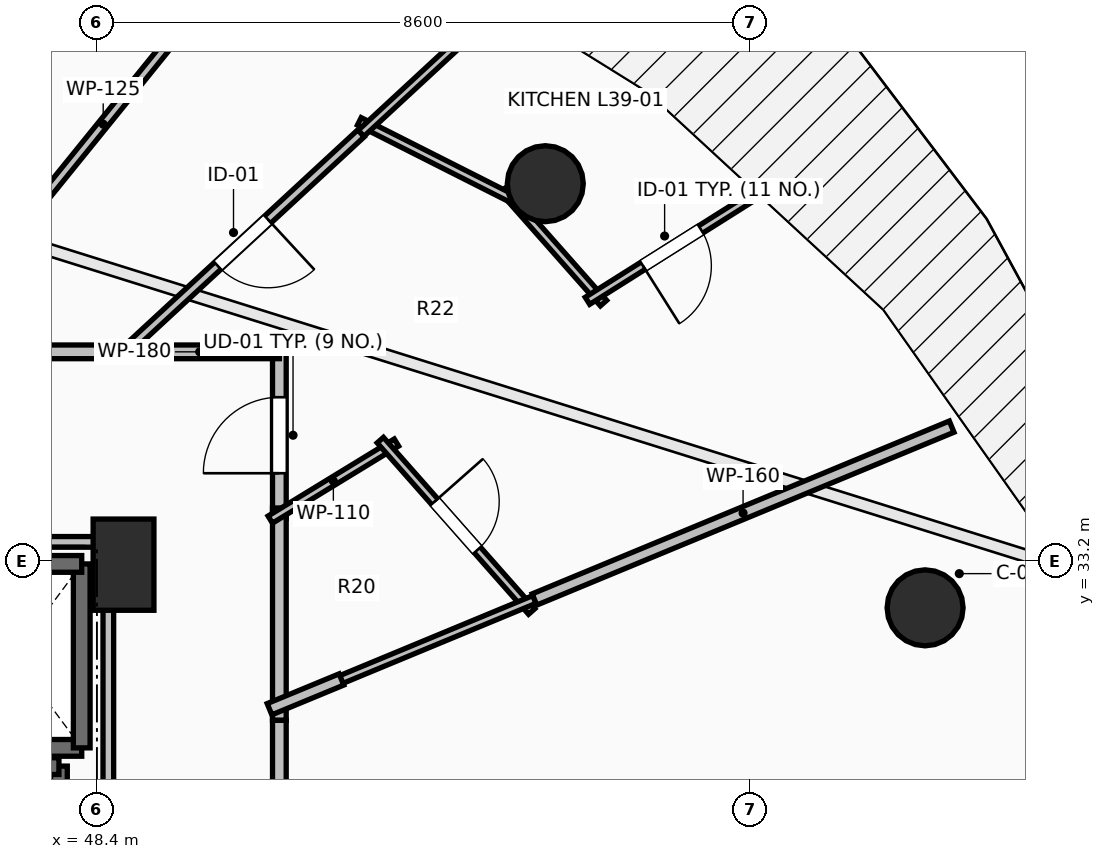
"""IFC4 building model, lengths in metres.
Left out: names, types, materials, properties, quantities, classifications, styles, units other than length and angle.
Written with IfcOpenShell. Run it as: python <this file> out.ifc"""

import sys

from ifc_helpers import new_model, si_unit, direction, frame, frame_2d, origin, origin_2d, place, context, subcontext, project, spatial, rectangle, circle, extrude, element, fill, save


model = new_model("IFC4")
c1 = context("Model", 3, precision=1e-05, world=origin(), true_north=direction((0.0, 1.0)))
c2 = subcontext(c1, "Body", "Model", "MODEL_VIEW")
j1 = project(units=[si_unit("LENGTHUNIT", "METRE"), si_unit("PLANEANGLEUNIT", "RADIAN")], contexts=[c1])
p1 = place(None, origin())
s1 = spatial("IfcSite", under=j1, at=p1, CompositionType="ELEMENT")
p2 = place(p1, origin())
s2 = spatial("IfcBuilding", under=s1, at=p2, CompositionType="ELEMENT")
p3 = place(p2, frame((0.0, 0.0, 146.6)))
s3 = spatial("IfcBuildingStorey", under=s2, at=p3, CompositionType="ELEMENT", Elevation=146.6)
for number, where, z_axis, x_axis in (
    (1, (59.295, 32.582, 0.0), (0.0, 0.0, 1.0), (0.924, 0.383, 0.0)),
    (2, (54.299, 38.162, 0.0), (0.0, 0.0, 1.0), (0.707, 0.707, 0.0)),
):
    element("IfcColumn", number, at=place(p3, frame(where, z_axis=z_axis, x_axis=x_axis)), inside=s3, PredefinedType="COLUMN", context=c2, shape_type="SweptSolid", body=[
        extrude(circle(Radius=0.5, at=origin_2d()), origin(), (0.0, 0.0, 1.0), 3.5),
    ])
p4 = place(p3, frame((48.75, 33.15, 0.0), z_axis=(0.0, 0.0, 1.0), x_axis=(1.0, 0.0, 0.0)))
e3 = element("IfcColumn", 3, at=p4, inside=s3, PredefinedType="PILASTER", context=c2, shape_type="SweptSolid", body=[
    extrude(rectangle(XDim=0.8, YDim=1.2, at=origin_2d()), origin(), (0.0, 0.0, 1.0), 3.5),
])
p5 = place(p3, frame((46.4, 30.74, 0.0), z_axis=(0.0, 0.0, 1.0), x_axis=(1.0, 0.0, 0.0)))
e4 = element("IfcWall", 4, at=p5, inside=s3, PredefinedType="SOLIDWALL", context=c2, shape_type="SweptSolid", body=[
    extrude(rectangle(XDim=1.8, YDim=0.22, at=frame_2d((0.9, 0.0))), origin(), (0.0, 0.0, 1.0), 3.24),
])
p6 = place(p3, frame((48.2, 30.74, 0.0), z_axis=(0.0, 0.0, 1.0), x_axis=(0.0, 1.0, 0.0)))
e5 = element("IfcWall", 5, at=p6, inside=s3, PredefinedType="SOLIDWALL", context=c2, shape_type="SweptSolid", body=[
    extrude(rectangle(XDim=2.42, YDim=0.22, at=frame_2d((1.21, 0.0))), origin(), (0.0, 0.0, 1.0), 3.24),
])
p7 = place(p3, frame((48.2, 33.16, 0.0), z_axis=(0.0, 0.0, 1.0), x_axis=(-1.0, 0.0, 0.0)))
e6 = element("IfcWall", 6, at=p7, inside=s3, PredefinedType="SOLIDWALL", context=c2, shape_type="SweptSolid", body=[
    extrude(rectangle(XDim=1.8, YDim=0.22, at=frame_2d((0.9, 0.0))), origin(), (0.0, 0.0, 1.0), 3.24),
])
p8 = place(p3, frame((47.9, 28.0, 0.0), z_axis=(0.0, 0.0, 1.0), x_axis=(0.0, 1.0, 0.0)))
e7 = element("IfcWall", 7, at=p8, inside=s3, PredefinedType="SHEAR", context=c2, shape_type="SweptSolid", body=[
    extrude(rectangle(XDim=2.5, YDim=0.22, at=frame_2d((1.25, 0.0))), origin(), (0.0, 0.0, 1.0), 3.24),
])
p9 = place(p3, frame((47.9, 30.5, 0.0), z_axis=(0.0, 0.0, 1.0), x_axis=(-1.0, 0.0, 0.0)))
e8 = element("IfcWall", 8, at=p9, inside=s3, PredefinedType="SHEAR", context=c2, shape_type="SweptSolid", body=[
    extrude(rectangle(XDim=2.4, YDim=0.22, at=frame_2d((1.2, 0.0))), origin(), (0.0, 0.0, 1.0), 3.24),
])
p10 = place(p3, frame((50.8, 33.756, 0.0), z_axis=(0.0, 0.0, 1.0), x_axis=(0.0, 1.0, 0.0)))
e9 = element("IfcWall", 9, at=p10, inside=s3, PredefinedType="PARTITIONING", context=c2, shape_type="SweptSolid", body=[
    extrude(rectangle(XDim=2.194, YDim=0.18, at=frame_2d((1.097, 0.0))), origin(), (0.0, 0.0, 1.0), 2.432),
])
p11 = place(p10, frame((0.597, 0.0, 0.0)))
e10 = element("IfcOpeningElement", 10, at=p11, cuts=e9, PredefinedType="OPENING", context=c2, shape_type="SweptSolid", body=[
    extrude(rectangle(XDim=1.0, YDim=2.15, at=frame_2d((0.5, 1.075))), frame((0.0, 0.105, 0.0), z_axis=(0.0, -1.0, 0.0), x_axis=(1.0, 0.0, 0.0)), (0.0, 0.0, 1.0), 0.21),
])
p12 = place(p3, frame((50.8, 35.95, 0.0), z_axis=(0.0, 0.0, 1.0), x_axis=(-1.0, 0.0, 0.0)))
e11 = element("IfcWall", 11, at=p12, inside=s3, PredefinedType="PARTITIONING", context=c2, shape_type="SweptSolid", body=[
    extrude(rectangle(XDim=2.096, YDim=0.18, at=frame_2d((1.048, 0.0))), origin(), (0.0, 0.0, 1.0), 2.972),
])
p13 = place(p3, frame((50.8, 31.102, 0.0), z_axis=(0.0, 0.0, 1.0), x_axis=(0.0, 1.0, 0.0)))
e12 = element("IfcWall", 12, at=p13, inside=s3, PredefinedType="PARTITIONING", context=c2, shape_type="SweptSolid", body=[
    extrude(rectangle(XDim=2.794, YDim=0.18, at=frame_2d((1.397, 0.0))), origin(), (0.0, 0.0, 1.0), 2.432),
])
p14 = place(p3, frame((48.704, 35.95, 0.0), z_axis=(0.0, 0.0, 1.0), x_axis=(-1.0, 0.0, 0.0)))
e13 = element("IfcWall", 13, at=p14, inside=s3, PredefinedType="PARTITIONING", context=c2, shape_type="SweptSolid", body=[
    extrude(rectangle(XDim=2.707, YDim=0.18, at=frame_2d((1.354, 0.0))), origin(), (0.0, 0.0, 1.0), 2.432),
])
p15 = place(p3, frame((50.8, 27.25, 0.0), z_axis=(0.0, 0.0, 1.0), x_axis=(0.0, 1.0, 0.0)))
e14 = element("IfcWall", 14, at=p15, inside=s3, PredefinedType="PARTITIONING", context=c2, shape_type="SweptSolid", body=[
    extrude(rectangle(XDim=3.852, YDim=0.18, at=frame_2d((1.926, 0.0))), origin(), (0.0, 0.0, 1.0), 2.432),
])
p16 = place(p3, frame((50.68, 33.743, 0.0), z_axis=(0.0, 0.0, 1.0), x_axis=(0.853368681548, 0.52130786811, 0.0)))
e15 = element("IfcWall", 15, at=p16, inside=s3, PredefinedType="PARTITIONING", context=c2, shape_type="SweptSolid", body=[
    extrude(rectangle(XDim=1.945, YDim=0.11, at=frame_2d((0.973, 0.0))), origin(), (0.0, 0.0, 1.0), 2.972),
])
p17 = place(p3, frame((52.128, 34.789, 0.0), z_axis=(0.0, 0.0, 1.0), x_axis=(0.66196248337, -0.74953697081, 0.0)))
e16 = element("IfcWall", 16, at=p17, inside=s3, PredefinedType="PARTITIONING", context=c2, shape_type="SweptSolid", body=[
    extrude(rectangle(XDim=3.008, YDim=0.11, at=frame_2d((1.504, 0.0))), origin(), (0.0, 0.0, 1.0), 2.432),
])
p18 = place(p17, frame((1.079, 0.0, 0.0)))
e17 = element("IfcOpeningElement", 17, at=p18, cuts=e16, PredefinedType="OPENING", context=c2, shape_type="SweptSolid", body=[
    extrude(rectangle(XDim=0.85, YDim=2.1, at=frame_2d((0.425, 1.05))), frame((0.0, 0.07, 0.0), z_axis=(0.0, -1.0, 0.0), x_axis=(1.0, 0.0, 0.0)), (0.0, 0.0, 1.0), 0.14),
])
p19 = place(p3, frame((54.156, 32.693, 0.0), z_axis=(0.0, 0.0, 1.0), x_axis=(-0.923770555063, -0.382946421316, 0.0)))
e18 = element("IfcWall", 18, at=p19, inside=s3, PredefinedType="PARTITIONING", context=c2, shape_type="SweptSolid", body=[
    extrude(rectangle(XDim=2.889, YDim=0.11, at=frame_2d((1.444, 0.0))), origin(), (0.0, 0.0, 1.0), 2.432),
])
p20 = place(p3, frame((55.065, 36.591, 0.0), z_axis=(0.0, 0.0, 1.0), x_axis=(-0.66216897397, 0.749354555542, 0.0)))
e19 = element("IfcWall", 19, at=p20, inside=s3, PredefinedType="PARTITIONING", context=c2, shape_type="SweptSolid", body=[
    extrude(rectangle(XDim=1.991, YDim=0.11, at=frame_2d((0.996, 0.0))), origin(), (0.0, 0.0, 1.0), 2.432),
])
p21 = place(p3, frame((53.964, 37.915, 0.0), z_axis=(0.0, 0.0, 1.0), x_axis=(-0.89250004606, 0.451047301049, 0.0)))
e20 = element("IfcWall", 20, at=p21, inside=s3, PredefinedType="PARTITIONING", context=c2, shape_type="SweptSolid", body=[
    extrude(rectangle(XDim=2.366, YDim=0.11, at=frame_2d((1.183, 0.0))), origin(), (0.0, 0.0, 1.0), 2.432),
])
p22 = place(p3, frame((51.874, 38.824, 0.0), z_axis=(0.0, 0.0, 1.0), x_axis=(0.734191073284, 0.678942904749, 0.0)))
e21 = element("IfcWall", 21, at=p22, inside=s3, PredefinedType="PARTITIONING", context=c2, shape_type="SweptSolid", body=[
    extrude(rectangle(XDim=2.523, YDim=0.11, at=frame_2d((1.262, 0.0))), origin(), (0.0, 0.0, 1.0), 2.728),
])
p23 = place(p3, frame((57.075, 38.021, 0.0), z_axis=(0.0, 0.0, 1.0), x_axis=(-0.846034075758, -0.533128823697, 0.0)))
e22 = element("IfcWall", 22, at=p23, inside=s3, PredefinedType="PARTITIONING", context=c2, shape_type="SweptSolid", body=[
    extrude(rectangle(XDim=2.626, YDim=0.11, at=frame_2d((1.313, 0.0))), origin(), (0.0, 0.0, 1.0), 2.728),
])
p24 = place(p23, frame((0.863, 0.0, 0.0)))
e23 = element("IfcOpeningElement", 23, at=p24, cuts=e22, PredefinedType="OPENING", context=c2, shape_type="SweptSolid", body=[
    extrude(rectangle(XDim=0.9, YDim=2.1, at=frame_2d((0.45, 1.05))), frame((0.0, 0.07, 0.0), z_axis=(0.0, -1.0, 0.0), x_axis=(1.0, 0.0, 0.0)), (0.0, 0.0, 1.0), 0.14),
])
p25 = place(p3, frame((51.874, 38.824, 0.0), z_axis=(0.0, 0.0, 1.0), x_axis=(-0.734347971597, -0.678773199685, 0.0)))
e24 = element("IfcWall", 24, at=p25, inside=s3, PredefinedType="PARTITIONING", context=c2, shape_type="SweptSolid", body=[
    extrude(rectangle(XDim=4.235, YDim=0.125, at=frame_2d((2.117, 0.0))), origin(), (0.0, 0.0, 1.0), 2.922),
])
p26 = place(p25, frame((1.667, 0.0, 0.0)))
e25 = element("IfcOpeningElement", 25, at=p26, cuts=e24, PredefinedType="OPENING", context=c2, shape_type="SweptSolid", body=[
    extrude(rectangle(XDim=0.9, YDim=2.1, at=frame_2d((0.45, 1.05))), frame((0.0, 0.077, 0.0), z_axis=(0.0, -1.0, 0.0), x_axis=(1.0, 0.0, 0.0)), (0.0, 0.0, 1.0), 0.155),
])
p27 = place(p3, frame((54.156, 32.692, 0.0), z_axis=(0.0, 0.0, 1.0), x_axis=(0.923849528339, 0.382755860814, 0.0)))
e26 = element("IfcWall", 26, at=p27, inside=s3, PredefinedType="PARTITIONING", context=c2, shape_type="SweptSolid", body=[
    extrude(rectangle(XDim=5.941, YDim=0.16, at=frame_2d((2.97, 0.0))), origin(), (0.0, 0.0, 1.0), 2.432),
])
p28 = place(p3, frame((50.671, 31.249, 0.0), z_axis=(0.0, 0.0, 1.0), x_axis=(0.924089428906, 0.38217630406, 0.0)))
e27 = element("IfcWall", 27, at=p28, inside=s3, PredefinedType="PARTITIONING", context=c2, shape_type="SweptSolid", body=[
    extrude(rectangle(XDim=1.024, YDim=0.16, at=frame_2d((0.512, 0.0))), origin(), (0.0, 0.0, 1.0), 3.24),
])
p29 = place(p3, frame((50.908, 41.94, 0.0), z_axis=(0.0, 0.0, 1.0), x_axis=(-0.62935766896, -0.77711577292, 0.0)))
e28 = element("IfcWall", 28, at=p29, inside=s3, PredefinedType="PARTITIONING", context=c2, shape_type="SweptSolid", body=[
    extrude(rectangle(XDim=7.708, YDim=0.125, at=frame_2d((3.854, 0.0))), origin(), (0.0, 0.0, 1.0), 2.432),
])
p30 = place(p3, frame((48.148, 43.057, 0.0), z_axis=(0.0, 0.0, 1.0), x_axis=(-0.511279346901, -0.859414585304, 0.0)))
e29 = element("IfcWall", 29, at=p30, inside=s3, PredefinedType="PARTITIONING", context=c2, shape_type="SweptSolid", body=[
    extrude(rectangle(XDim=8.27, YDim=0.125, at=frame_2d((4.135, 0.0))), origin(), (0.0, 0.0, 1.0), 2.432),
])
p31 = place(p3, frame((48.55, 28.196, 0.0), z_axis=(0.0, 0.0, 1.0), x_axis=(0.0, 1.0, 0.0)))
e30 = element("IfcWall", 30, at=p31, inside=s3, PredefinedType="PARTITIONING", context=c2, shape_type="SweptSolid", body=[
    extrude(rectangle(XDim=5.254, YDim=0.14, at=frame_2d((2.627, 0.0))), origin(), (0.0, 0.0, 1.0), 2.432),
])
p32 = place(p3, frame((48.55, 33.45, 0.0), z_axis=(0.0, 0.0, 1.0), x_axis=(-1.0, 0.0, 0.0)))
e31 = element("IfcWall", 31, at=p32, inside=s3, PredefinedType="PARTITIONING", context=c2, shape_type="SweptSolid", body=[
    extrude(rectangle(XDim=4.21, YDim=0.14, at=frame_2d((2.105, 0.0))), origin(), (0.0, 0.0, 1.0), 2.432),
])
p33 = place(p11, origin())
e32 = element("IfcDoor", 32, at=p33, inside=s3, OperationType="SINGLE_SWING_LEFT", PredefinedType="DOOR", context=c2, shape_type="SweptSolid", body=[
    extrude(rectangle(XDim=1.0, YDim=2.15, at=frame_2d((0.5, 1.075))), frame((0.0, 0.025, 0.0), z_axis=(0.0, -1.0, 0.0), x_axis=(1.0, 0.0, 0.0)), (0.0, 0.0, 1.0), 0.05),
])
fill(e10, e32)
p34 = place(p18, origin())
e33 = element("IfcDoor", 33, at=p34, inside=s3, OperationType="SINGLE_SWING_LEFT", PredefinedType="DOOR", context=c2, shape_type="SweptSolid", body=[
    extrude(rectangle(XDim=0.85, YDim=2.1, at=frame_2d((0.425, 1.05))), frame((0.0, 0.025, 0.0), z_axis=(0.0, -1.0, 0.0), x_axis=(1.0, 0.0, 0.0)), (0.0, 0.0, 1.0), 0.05),
])
fill(e17, e33)
p35 = place(p24, origin())
e34 = element("IfcDoor", 34, at=p35, inside=s3, OperationType="SINGLE_SWING_RIGHT", PredefinedType="DOOR", context=c2, shape_type="SweptSolid", body=[
    extrude(rectangle(XDim=0.9, YDim=2.1, at=frame_2d((0.45, 1.05))), frame((0.0, 0.025, 0.0), z_axis=(0.0, -1.0, 0.0), x_axis=(1.0, 0.0, 0.0)), (0.0, 0.0, 1.0), 0.05),
])
fill(e23, e34)
p36 = place(p26, origin())
e35 = element("IfcDoor", 35, at=p36, inside=s3, OperationType="SINGLE_SWING_LEFT", PredefinedType="DOOR", context=c2, shape_type="SweptSolid", body=[
    extrude(rectangle(XDim=0.9, YDim=2.1, at=frame_2d((0.45, 1.05))), frame((0.0, 0.025, 0.0), z_axis=(0.0, -1.0, 0.0), x_axis=(1.0, 0.0, 0.0)), (0.0, 0.0, 1.0), 0.05),
])
fill(e25, e35)
save(model, sys.argv[1])
